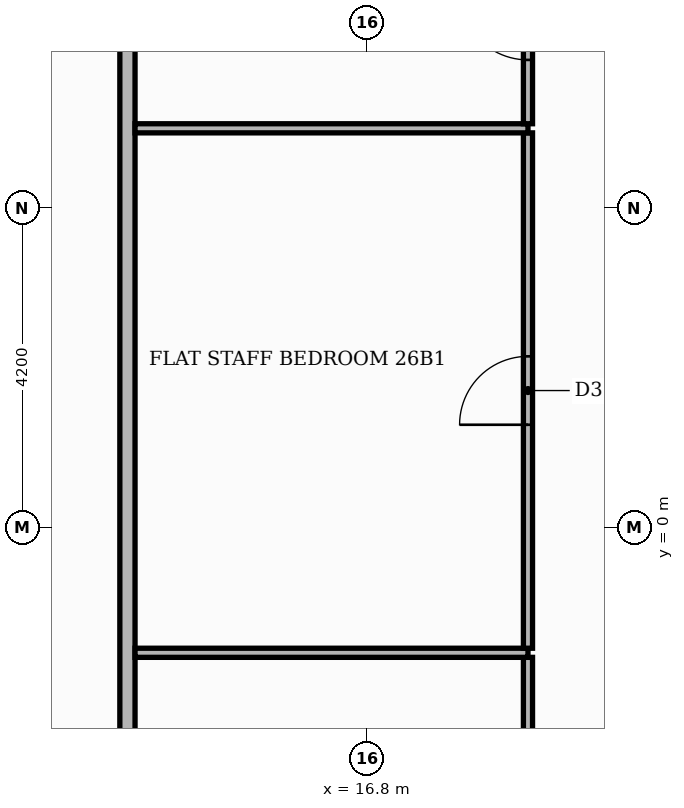
"""IFC4 building model, lengths in metres.
Left out: names, types, materials, properties, quantities, classifications, styles, units other than length and angle.
Written with IfcOpenShell. Run it as: python <this file> out.ifc"""

import sys

from ifc_helpers import new_model, si_unit, direction, frame, frame_2d, origin, place, context, subcontext, project, spatial, rectangle, extrude, element, fill, save


model = new_model("IFC4")
c1 = context("Model", 3, precision=1e-05, world=origin(), true_north=direction((0.0, 1.0)))
c2 = subcontext(c1, "Body", "Model", "MODEL_VIEW")
j1 = project(units=[si_unit("LENGTHUNIT", "METRE"), si_unit("PLANEANGLEUNIT", "RADIAN")], contexts=[c1])
p1 = place(None, origin())
s1 = spatial("IfcSite", under=j1, at=p1, CompositionType="ELEMENT")
p2 = place(p1, origin())
s2 = spatial("IfcBuilding", under=s1, at=p2, CompositionType="ELEMENT")
p3 = place(p2, frame((0.0, 0.0, 110.4)))
s3 = spatial("IfcBuildingStorey", under=s2, at=p3, CompositionType="ELEMENT", Elevation=110.4)
p4 = place(p3, frame((13.65, -13.55, 0.0), z_axis=(0.0, 0.0, 1.0), x_axis=(0.0, 1.0, 0.0)))
e1 = element("IfcWall", 1, at=p4, inside=s3, PredefinedType="PARTITIONING", context=c2, shape_type="SweptSolid", body=[
    extrude(rectangle(XDim=27.1, YDim=0.2, at=frame_2d((13.55, 0.0))), origin(), (0.0, 0.0, 1.0), 3.48),
])
p5 = place(p4, frame((2.5, 0.0, 0.0)))
e2 = element("IfcOpeningElement", 2, at=p5, cuts=e1, PredefinedType="OPENING", context=c2, shape_type="SweptSolid", body=[
    extrude(rectangle(XDim=1.1, YDim=2.4, at=frame_2d((0.55, 1.2))), frame((0.0, 0.11, 0.0), z_axis=(0.0, -1.0, 0.0), x_axis=(1.0, 0.0, 0.0)), (0.0, 0.0, 1.0), 0.22),
])
p6 = place(p3, frame((18.92, -7.29, 0.0), z_axis=(0.0, 0.0, 1.0), x_axis=(0.0, 1.0, 0.0)))
e3 = element("IfcWall", 3, at=p6, inside=s3, PredefinedType="PARTITIONING", context=c2, shape_type="SweptSolid", body=[
    extrude(rectangle(XDim=5.58, YDim=0.12, at=frame_2d((2.79, 0.0))), origin(), (0.0, 0.0, 1.0), 3.48),
])
p7 = place(p6, frame((2.34, 0.0, 0.0)))
e4 = element("IfcOpeningElement", 4, at=p7, cuts=e3, PredefinedType="OPENING", context=c2, shape_type="SweptSolid", body=[
    extrude(rectangle(XDim=0.9, YDim=2.1, at=frame_2d((0.45, 1.05))), frame((0.0, 0.07, 0.0), z_axis=(0.0, -1.0, 0.0), x_axis=(1.0, 0.0, 0.0)), (0.0, 0.0, 1.0), 0.14),
])
p8 = place(p3, frame((13.75, -1.65, 0.0), z_axis=(0.0, 0.0, 1.0), x_axis=(1.0, 0.0, 0.0)))
e5 = element("IfcWall", 5, at=p8, inside=s3, PredefinedType="PARTITIONING", context=c2, shape_type="SweptSolid", body=[
    extrude(rectangle(XDim=5.17, YDim=0.12, at=frame_2d((2.585, 0.0))), origin(), (0.0, 0.0, 1.0), 3.48),
])
p9 = place(p3, frame((18.92, -1.59, 0.0), z_axis=(0.0, 0.0, 1.0), x_axis=(0.0, 1.0, 0.0)))
e6 = element("IfcWall", 6, at=p9, inside=s3, PredefinedType="PARTITIONING", context=c2, shape_type="SweptSolid", body=[
    extrude(rectangle(XDim=6.78, YDim=0.12, at=frame_2d((3.39, 0.0))), origin(), (0.0, 0.0, 1.0), 3.48),
])
p10 = place(p9, frame((2.94, 0.0, 0.0)))
e7 = element("IfcOpeningElement", 7, at=p10, cuts=e6, PredefinedType="OPENING", context=c2, shape_type="SweptSolid", body=[
    extrude(rectangle(XDim=0.9, YDim=2.1, at=frame_2d((0.45, 1.05))), frame((0.0, 0.07, 0.0), z_axis=(0.0, -1.0, 0.0), x_axis=(1.0, 0.0, 0.0)), (0.0, 0.0, 1.0), 0.14),
])
p11 = place(p3, frame((13.75, 5.25, 0.0), z_axis=(0.0, 0.0, 1.0), x_axis=(1.0, 0.0, 0.0)))
e8 = element("IfcWall", 8, at=p11, inside=s3, PredefinedType="PARTITIONING", context=c2, shape_type="SweptSolid", body=[
    extrude(rectangle(XDim=5.17, YDim=0.12, at=frame_2d((2.585, 0.0))), origin(), (0.0, 0.0, 1.0), 3.48),
])
p12 = place(p3, frame((18.92, 5.31, 0.0), z_axis=(0.0, 0.0, 1.0), x_axis=(0.0, 1.0, 0.0)))
e9 = element("IfcWall", 9, at=p12, inside=s3, PredefinedType="PARTITIONING", context=c2, shape_type="SweptSolid", body=[
    extrude(rectangle(XDim=2.58, YDim=0.12, at=frame_2d((1.29, 0.0))), origin(), (0.0, 0.0, 1.0), 3.48),
])
p13 = place(p12, frame((0.84, 0.0, 0.0)))
e10 = element("IfcOpeningElement", 10, at=p13, cuts=e9, PredefinedType="OPENING", context=c2, shape_type="SweptSolid", body=[
    extrude(rectangle(XDim=0.9, YDim=2.1, at=frame_2d((0.45, 1.05))), frame((0.0, 0.07, 0.0), z_axis=(0.0, -1.0, 0.0), x_axis=(1.0, 0.0, 0.0)), (0.0, 0.0, 1.0), 0.14),
])
p14 = place(p10, origin())
e11 = element("IfcDoor", 11, at=p14, inside=s3, OperationType="SINGLE_SWING_LEFT", PredefinedType="DOOR", context=c2, shape_type="SweptSolid", body=[
    extrude(rectangle(XDim=0.9, YDim=2.1, at=frame_2d((0.45, 1.05))), frame((0.0, 0.025, 0.0), z_axis=(0.0, -1.0, 0.0), x_axis=(1.0, 0.0, 0.0)), (0.0, 0.0, 1.0), 0.05),
])
fill(e7, e11)
p15 = place(p13, origin())
e12 = element("IfcDoor", 12, at=p15, inside=s3, OperationType="SINGLE_SWING_RIGHT", PredefinedType="DOOR", context=c2, shape_type="SweptSolid", body=[
    extrude(rectangle(XDim=0.9, YDim=2.1, at=frame_2d((0.45, 1.05))), frame((0.0, 0.025, 0.0), z_axis=(0.0, -1.0, 0.0), x_axis=(1.0, 0.0, 0.0)), (0.0, 0.0, 1.0), 0.05),
])
fill(e10, e12)
save(model, sys.argv[1])
